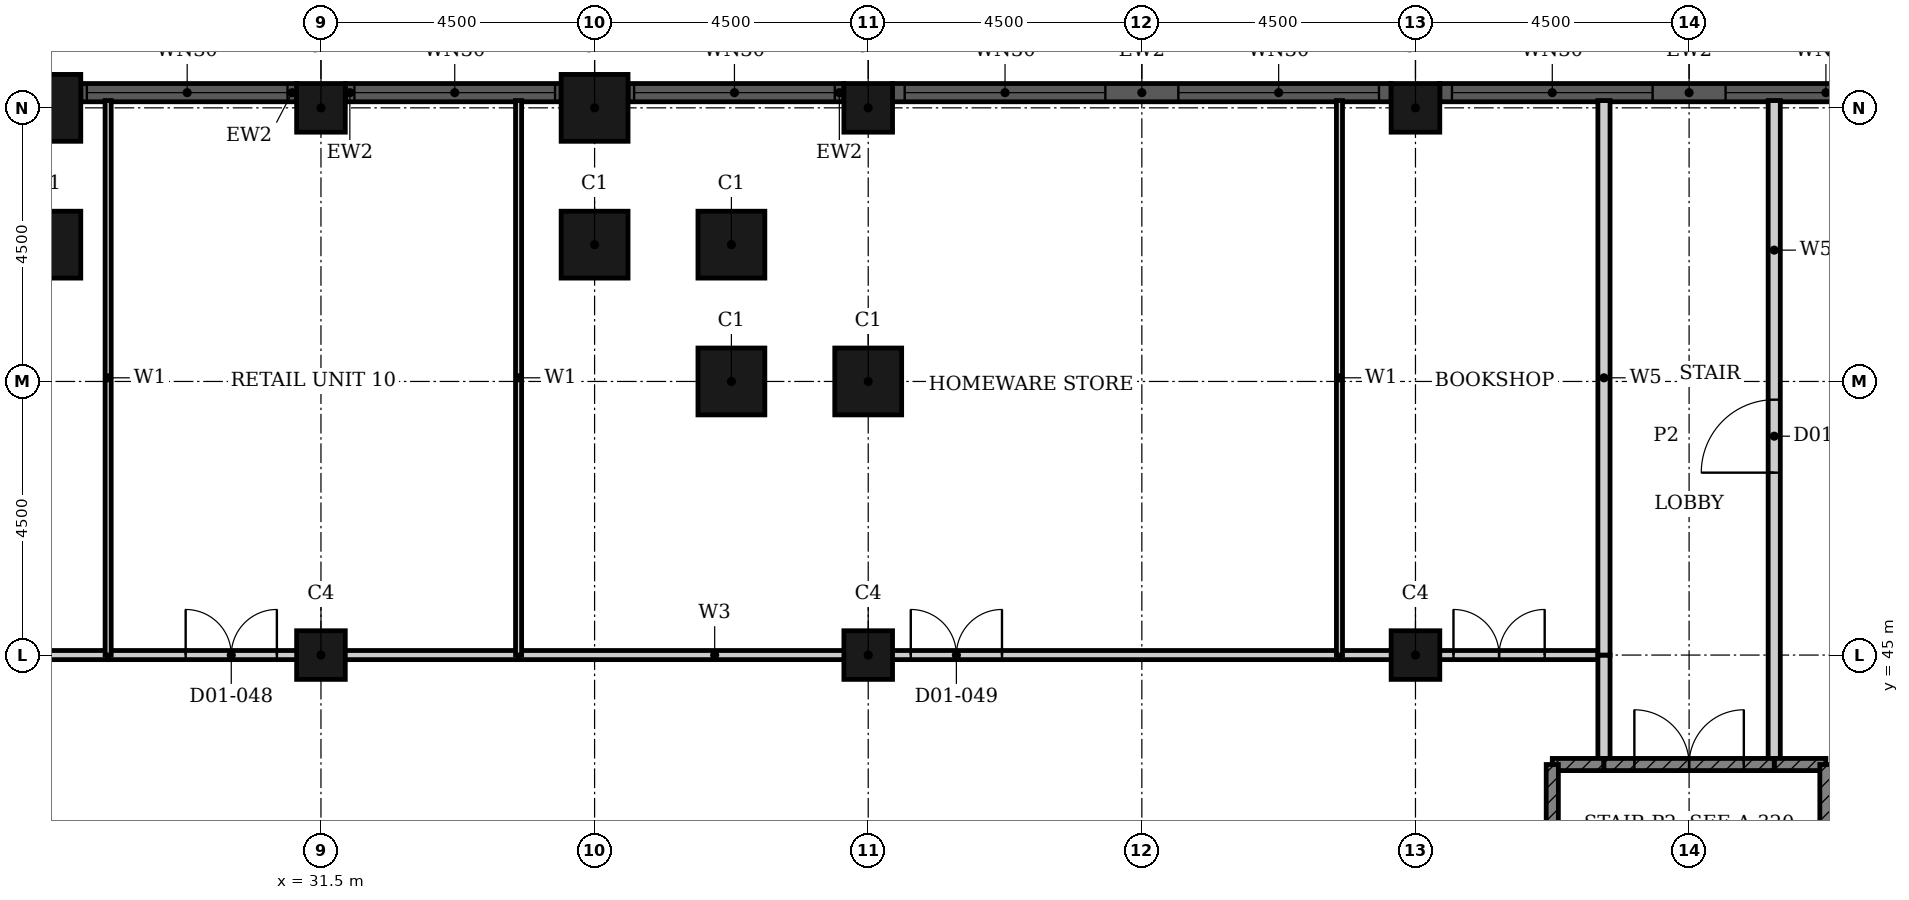
"""IFC4 building model, lengths in metres.
Left out: names, types, materials, properties, quantities, classifications, styles, units other than length and angle.
Written with IfcOpenShell. Run it as: python <this file> out.ifc"""

import sys

from ifc_helpers import new_model, si_unit, direction, frame, frame_2d, origin, origin_2d, place, context, subcontext, project, spatial, rectangle, hollow_rectangle, extrude, element, fill, save


model = new_model("IFC4")
c1 = context("Model", 3, precision=1e-05, world=origin(), true_north=direction((0.0, 1.0)))
c2 = subcontext(c1, "Body", "Model", "MODEL_VIEW")
j1 = project(units=[si_unit("LENGTHUNIT", "METRE"), si_unit("PLANEANGLEUNIT", "RADIAN")], contexts=[c1])
p1 = place(None, origin())
s1 = spatial("IfcSite", under=j1, at=p1, CompositionType="ELEMENT")
p2 = place(p1, origin())
s2 = spatial("IfcBuilding", under=s1, at=p2, CompositionType="ELEMENT")
p3 = place(p2, frame((0.0, 0.0, 6.6)))
s3 = spatial("IfcBuildingStorey", under=s2, at=p3, CompositionType="ELEMENT", Elevation=6.6)
for number, where, z_axis, x_axis in (
    (1, (40.5, 49.5, 0.0), (0.0, 0.0, 1.0), (1.0, 0.0, 0.0)),
    (2, (38.25, 49.5, 0.0), (0.0, 0.0, 1.0), (1.0, 0.0, 0.0)),
    (3, (38.25, 51.75, 0.0), (0.0, 0.0, 1.0), (1.0, 0.0, 0.0)),
    (4, (36.0, 51.75, 0.0), (0.0, 0.0, 1.0), (1.0, 0.0, 0.0)),
    (5, (36.0, 54.0, 0.0), (0.0, 0.0, 1.0), (1.0, 0.0, 0.0)),
    (6, (27.0, 54.0, 0.0), (0.0, 0.0, 1.0), (1.0, 0.0, 0.0)),
    (7, (27.0, 51.75, 0.0), (0.0, 0.0, 1.0), (1.0, 0.0, 0.0)),
):
    element("IfcColumn", number, at=place(p3, frame(where, z_axis=z_axis, x_axis=x_axis)), inside=s3, PredefinedType="COLUMN", context=c2, shape_type="SweptSolid", body=[
        extrude(hollow_rectangle(XDim=1.1, YDim=1.1, WallThickness=0.036, at=origin_2d()), origin(), (0.0, 0.0, 1.0), 5.4),
    ])
for number, where, z_axis, x_axis in (
    (8, (31.5, 54.0, 0.0), (0.0, 0.0, 1.0), (1.0, 0.0, 0.0)),
    (9, (40.5, 54.0, 0.0), (0.0, 0.0, 1.0), (1.0, 0.0, 0.0)),
    (10, (49.5, 54.0, 0.0), (0.0, 0.0, 1.0), (1.0, 0.0, 0.0)),
    (11, (31.5, 45.0, 0.0), (0.0, 0.0, 1.0), (1.0, 0.0, 0.0)),
    (12, (40.5, 45.0, 0.0), (0.0, 0.0, 1.0), (1.0, 0.0, 0.0)),
    (13, (49.5, 45.0, 0.0), (0.0, 0.0, 1.0), (1.0, 0.0, 0.0)),
):
    element("IfcColumn", number, at=place(p3, frame(where, z_axis=z_axis, x_axis=x_axis)), inside=s3, PredefinedType="COLUMN", context=c2, shape_type="SweptSolid", body=[
        extrude(hollow_rectangle(XDim=0.8, YDim=0.8, WallThickness=0.025, at=origin_2d()), origin(), (0.0, 0.0, 1.0), 5.4),
    ])
p4 = place(p3, frame((58.1, 54.25, 0.0), z_axis=(0.0, 0.0, 1.0), x_axis=(-1.0, 0.0, 0.0)))
e14 = element("IfcWall", 14, at=p4, inside=s3, PredefinedType="SOLIDWALL", context=c2, shape_type="SweptSolid", body=[
    extrude(rectangle(XDim=8.2, YDim=0.3, at=frame_2d((4.1, 0.0))), origin(), (0.0, 0.0, 1.0), 5.4),
])
p5 = place(p4, frame((0.2, 0.0, 0.9)))
e15 = element("IfcOpeningElement", 15, at=p5, cuts=e14, PredefinedType="OPENING", context=c2, shape_type="SweptSolid", body=[
    extrude(rectangle(XDim=3.3, YDim=3.5, at=frame_2d((1.65, 1.75))), frame((0.0, 0.16, 0.0), z_axis=(0.0, -1.0, 0.0), x_axis=(1.0, 0.0, 0.0)), (0.0, 0.0, 1.0), 0.32),
])
p6 = place(p4, frame((4.7, 0.0, 0.9)))
e16 = element("IfcOpeningElement", 16, at=p6, cuts=e14, PredefinedType="OPENING", context=c2, shape_type="SweptSolid", body=[
    extrude(rectangle(XDim=3.3, YDim=3.5, at=frame_2d((1.65, 1.75))), frame((0.0, 0.16, 0.0), z_axis=(0.0, -1.0, 0.0), x_axis=(1.0, 0.0, 0.0)), (0.0, 0.0, 1.0), 0.32),
])
p7 = place(p3, frame((49.1, 54.25, 0.0), z_axis=(0.0, 0.0, 1.0), x_axis=(-1.0, 0.0, 0.0)))
e17 = element("IfcWall", 17, at=p7, inside=s3, PredefinedType="SOLIDWALL", context=c2, shape_type="SweptSolid", body=[
    extrude(rectangle(XDim=8.2, YDim=0.3, at=frame_2d((4.1, 0.0))), origin(), (0.0, 0.0, 1.0), 5.4),
])
p8 = place(p7, frame((0.2, 0.0, 0.9)))
e18 = element("IfcOpeningElement", 18, at=p8, cuts=e17, PredefinedType="OPENING", context=c2, shape_type="SweptSolid", body=[
    extrude(rectangle(XDim=3.3, YDim=3.5, at=frame_2d((1.65, 1.75))), frame((0.0, 0.16, 0.0), z_axis=(0.0, -1.0, 0.0), x_axis=(1.0, 0.0, 0.0)), (0.0, 0.0, 1.0), 0.32),
])
p9 = place(p7, frame((4.7, 0.0, 0.9)))
e19 = element("IfcOpeningElement", 19, at=p9, cuts=e17, PredefinedType="OPENING", context=c2, shape_type="SweptSolid", body=[
    extrude(rectangle(XDim=3.3, YDim=3.5, at=frame_2d((1.65, 1.75))), frame((0.0, 0.16, 0.0), z_axis=(0.0, -1.0, 0.0), x_axis=(1.0, 0.0, 0.0)), (0.0, 0.0, 1.0), 0.32),
])
p10 = place(p3, frame((40.1, 54.25, 0.0), z_axis=(0.0, 0.0, 1.0), x_axis=(-1.0, 0.0, 0.0)))
e20 = element("IfcWall", 20, at=p10, inside=s3, PredefinedType="SOLIDWALL", context=c2, shape_type="SweptSolid", body=[
    extrude(rectangle(XDim=3.55, YDim=0.3, at=frame_2d((1.775, 0.0))), origin(), (0.0, 0.0, 1.0), 5.4),
])
p11 = place(p10, frame((0.15, 0.0, 0.9)))
e21 = element("IfcOpeningElement", 21, at=p11, cuts=e20, PredefinedType="OPENING", context=c2, shape_type="SweptSolid", body=[
    extrude(rectangle(XDim=3.3, YDim=3.5, at=frame_2d((1.65, 1.75))), frame((0.0, 0.16, 0.0), z_axis=(0.0, -1.0, 0.0), x_axis=(1.0, 0.0, 0.0)), (0.0, 0.0, 1.0), 0.32),
])
p12 = place(p3, frame((35.45, 54.25, 0.0), z_axis=(0.0, 0.0, 1.0), x_axis=(-1.0, 0.0, 0.0)))
e22 = element("IfcWall", 22, at=p12, inside=s3, PredefinedType="SOLIDWALL", context=c2, shape_type="SweptSolid", body=[
    extrude(rectangle(XDim=3.55, YDim=0.3, at=frame_2d((1.775, 0.0))), origin(), (0.0, 0.0, 1.0), 5.4),
])
p13 = place(p12, frame((0.1, 0.0, 0.9)))
e23 = element("IfcOpeningElement", 23, at=p13, cuts=e22, PredefinedType="OPENING", context=c2, shape_type="SweptSolid", body=[
    extrude(rectangle(XDim=3.3, YDim=3.5, at=frame_2d((1.65, 1.75))), frame((0.0, 0.16, 0.0), z_axis=(0.0, -1.0, 0.0), x_axis=(1.0, 0.0, 0.0)), (0.0, 0.0, 1.0), 0.32),
])
p14 = place(p3, frame((31.1, 54.25, 0.0), z_axis=(0.0, 0.0, 1.0), x_axis=(-1.0, 0.0, 0.0)))
e24 = element("IfcWall", 24, at=p14, inside=s3, PredefinedType="SOLIDWALL", context=c2, shape_type="SweptSolid", body=[
    extrude(rectangle(XDim=3.55, YDim=0.3, at=frame_2d((1.775, 0.0))), origin(), (0.0, 0.0, 1.0), 5.4),
])
p15 = place(p14, frame((0.15, 0.0, 0.9)))
e25 = element("IfcOpeningElement", 25, at=p15, cuts=e24, PredefinedType="OPENING", context=c2, shape_type="SweptSolid", body=[
    extrude(rectangle(XDim=3.3, YDim=3.5, at=frame_2d((1.65, 1.75))), frame((0.0, 0.16, 0.0), z_axis=(0.0, -1.0, 0.0), x_axis=(1.0, 0.0, 0.0)), (0.0, 0.0, 1.0), 0.32),
])
p16 = place(p3, frame((18.0, 45.0, 0.0), z_axis=(0.0, 0.0, 1.0), x_axis=(1.0, 0.0, 0.0)))
e26 = element("IfcWall", 26, at=p16, inside=s3, PredefinedType="PARTITIONING", context=c2, shape_type="SweptSolid", body=[
    extrude(rectangle(XDim=10.0, YDim=0.15, at=frame_2d((5.0, 0.0))), origin(), (0.0, 0.0, 1.0), 5.05),
])
p17 = place(p16, frame((5.15, 0.0, 0.0)))
e27 = element("IfcOpeningElement", 27, at=p17, cuts=e26, PredefinedType="OPENING", context=c2, shape_type="SweptSolid", body=[
    extrude(rectangle(XDim=1.5, YDim=2.4, at=frame_2d((0.75, 1.2))), frame((0.0, 0.085, 0.0), z_axis=(0.0, -1.0, 0.0), x_axis=(1.0, 0.0, 0.0)), (0.0, 0.0, 1.0), 0.17),
])
p18 = place(p3, frame((28.0, 45.0, 0.0), z_axis=(0.0, 0.0, 1.0), x_axis=(1.0, 0.0, 0.0)))
e28 = element("IfcWall", 28, at=p18, inside=s3, PredefinedType="PARTITIONING", context=c2, shape_type="SweptSolid", body=[
    extrude(rectangle(XDim=6.75, YDim=0.15, at=frame_2d((3.375, 0.0))), origin(), (0.0, 0.0, 1.0), 5.05),
])
p19 = place(p18, frame((1.275, 0.0, 0.0)))
e29 = element("IfcOpeningElement", 29, at=p19, cuts=e28, PredefinedType="OPENING", context=c2, shape_type="SweptSolid", body=[
    extrude(rectangle(XDim=1.5, YDim=2.4, at=frame_2d((0.75, 1.2))), frame((0.0, 0.085, 0.0), z_axis=(0.0, -1.0, 0.0), x_axis=(1.0, 0.0, 0.0)), (0.0, 0.0, 1.0), 0.17),
])
p20 = place(p3, frame((34.75, 45.0, 0.0), z_axis=(0.0, 0.0, 1.0), x_axis=(1.0, 0.0, 0.0)))
e30 = element("IfcWall", 30, at=p20, inside=s3, PredefinedType="PARTITIONING", context=c2, shape_type="SweptSolid", body=[
    extrude(rectangle(XDim=13.5, YDim=0.15, at=frame_2d((6.75, 0.0))), origin(), (0.0, 0.0, 1.0), 5.05),
])
p21 = place(p20, frame((6.45, 0.0, 0.0)))
e31 = element("IfcOpeningElement", 31, at=p21, cuts=e30, PredefinedType="OPENING", context=c2, shape_type="SweptSolid", body=[
    extrude(rectangle(XDim=1.5, YDim=2.4, at=frame_2d((0.75, 1.2))), frame((0.0, 0.085, 0.0), z_axis=(0.0, -1.0, 0.0), x_axis=(1.0, 0.0, 0.0)), (0.0, 0.0, 1.0), 0.17),
])
p22 = place(p3, frame((48.25, 45.0, 0.0), z_axis=(0.0, 0.0, 1.0), x_axis=(1.0, 0.0, 0.0)))
e32 = element("IfcWall", 32, at=p22, inside=s3, PredefinedType="PARTITIONING", context=c2, shape_type="SweptSolid", body=[
    extrude(rectangle(XDim=4.35, YDim=0.15, at=frame_2d((2.175, 0.0))), origin(), (0.0, 0.0, 1.0), 5.05),
])
p23 = place(p22, frame((1.875, 0.0, 0.0)))
e33 = element("IfcOpeningElement", 33, at=p23, cuts=e32, PredefinedType="OPENING", context=c2, shape_type="SweptSolid", body=[
    extrude(rectangle(XDim=1.5, YDim=2.4, at=frame_2d((0.75, 1.2))), frame((0.0, 0.085, 0.0), z_axis=(0.0, -1.0, 0.0), x_axis=(1.0, 0.0, 0.0)), (0.0, 0.0, 1.0), 0.17),
])
for number, where, z_axis, x_axis in (
    (34, (28.0, 45.0, 0.0), (0.0, 0.0, 1.0), (0.0, 1.0, 0.0)),
    (35, (34.75, 45.0, 0.0), (0.0, 0.0, 1.0), (0.0, 1.0, 0.0)),
    (36, (48.25, 45.0, 0.0), (0.0, 0.0, 1.0), (0.0, 1.0, 0.0)),
):
    element("IfcWall", number, at=place(p3, frame(where, z_axis=z_axis, x_axis=x_axis)), inside=s3, PredefinedType="PARTITIONING", context=c2, shape_type="SweptSolid", body=[
        extrude(rectangle(XDim=9.12, YDim=0.1, at=frame_2d((4.56, 0.0))), origin(), (0.0, 0.0, 1.0), 5.05),
    ])
p24 = place(p3, frame((52.6, 43.2, 0.0), z_axis=(0.0, 0.0, 1.0), x_axis=(0.0, 1.0, 0.0)))
e37 = element("IfcWall", 37, at=p24, inside=s3, PredefinedType="PARTITIONING", context=c2, shape_type="SweptSolid", body=[
    extrude(rectangle(XDim=1.8, YDim=0.2, at=frame_2d((0.9, 0.0))), origin(), (0.0, 0.0, 1.0), 5.05),
])
p25 = place(p3, frame((52.6, 45.0, 0.0), z_axis=(0.0, 0.0, 1.0), x_axis=(0.0, 1.0, 0.0)))
e38 = element("IfcWall", 38, at=p25, inside=s3, PredefinedType="PARTITIONING", context=c2, shape_type="SweptSolid", body=[
    extrude(rectangle(XDim=9.12, YDim=0.2, at=frame_2d((4.56, 0.0))), origin(), (0.0, 0.0, 1.0), 5.05),
])
p26 = place(p3, frame((55.4, 43.2, 0.0), z_axis=(0.0, 0.0, 1.0), x_axis=(0.0, 1.0, 0.0)))
e39 = element("IfcWall", 39, at=p26, inside=s3, PredefinedType="PARTITIONING", context=c2, shape_type="SweptSolid", body=[
    extrude(rectangle(XDim=10.92, YDim=0.2, at=frame_2d((5.46, 0.0))), origin(), (0.0, 0.0, 1.0), 5.05),
])
p27 = place(p26, frame((4.8, 0.0, 0.0)))
e40 = element("IfcOpeningElement", 40, at=p27, cuts=e39, PredefinedType="OPENING", context=c2, shape_type="SweptSolid", body=[
    extrude(rectangle(XDim=1.2, YDim=2.1, at=frame_2d((0.6, 1.05))), frame((0.0, 0.11, 0.0), z_axis=(0.0, -1.0, 0.0), x_axis=(1.0, 0.0, 0.0)), (0.0, 0.0, 1.0), 0.22),
])
for number, where, z_axis, x_axis in (
    (41, (51.75, 43.2, 0.0), (0.0, 0.0, 1.0), (1.0, 0.0, 0.0)),
    (42, (55.4, 43.2, 0.0), (0.0, 0.0, 1.0), (1.0, 0.0, 0.0)),
):
    element("IfcWall", number, at=place(p3, frame(where, z_axis=z_axis, x_axis=x_axis)), inside=s3, PredefinedType="SHEAR", context=c2, shape_type="SweptSolid", body=[
        extrude(rectangle(XDim=0.85, YDim=0.2, at=frame_2d((0.425, 0.0))), origin(), (0.0, 0.0, 1.0), 5.05),
    ])
p28 = place(p3, frame((52.6, 43.2, 0.0), z_axis=(0.0, 0.0, 1.0), x_axis=(1.0, 0.0, 0.0)))
e43 = element("IfcWall", 43, at=p28, inside=s3, PredefinedType="SHEAR", context=c2, shape_type="SweptSolid", body=[
    extrude(rectangle(XDim=2.8, YDim=0.2, at=frame_2d((1.4, 0.0))), origin(), (0.0, 0.0, 1.0), 5.05),
])
p29 = place(p28, frame((0.5, 0.0, 0.0)))
e44 = element("IfcOpeningElement", 44, at=p29, cuts=e43, PredefinedType="OPENING", context=c2, shape_type="SweptSolid", body=[
    extrude(rectangle(XDim=1.8, YDim=2.1, at=frame_2d((0.9, 1.05))), frame((0.0, 0.11, 0.0), z_axis=(0.0, -1.0, 0.0), x_axis=(1.0, 0.0, 0.0)), (0.0, 0.0, 1.0), 0.22),
])
for number, where, z_axis, x_axis in (
    (45, (51.75, 34.75, 0.0), (0.0, 0.0, 1.0), (0.0, 1.0, 0.0)),
    (46, (56.25, 34.75, 0.0), (0.0, 0.0, 1.0), (0.0, 1.0, 0.0)),
):
    element("IfcWall", number, at=place(p3, frame(where, z_axis=z_axis, x_axis=x_axis)), inside=s3, PredefinedType="SHEAR", context=c2, shape_type="SweptSolid", body=[
        extrude(rectangle(XDim=8.45, YDim=0.2, at=frame_2d((4.225, 0.0))), origin(), (0.0, 0.0, 1.0), 5.05),
    ])
p30 = place(p5, origin())
e47 = element("IfcWindow", 47, at=p30, inside=s3, PartitioningType="SINGLE_PANEL", PredefinedType="WINDOW", context=c2, shape_type="SweptSolid", body=[
    extrude(rectangle(XDim=3.3, YDim=3.5, at=frame_2d((1.65, 1.75))), frame((0.0, 0.03, 0.0), z_axis=(0.0, -1.0, 0.0), x_axis=(1.0, 0.0, 0.0)), (0.0, 0.0, 1.0), 0.06),
])
fill(e15, e47)
p31 = place(p6, origin())
e48 = element("IfcWindow", 48, at=p31, inside=s3, PartitioningType="SINGLE_PANEL", PredefinedType="WINDOW", context=c2, shape_type="SweptSolid", body=[
    extrude(rectangle(XDim=3.3, YDim=3.5, at=frame_2d((1.65, 1.75))), frame((0.0, 0.03, 0.0), z_axis=(0.0, -1.0, 0.0), x_axis=(1.0, 0.0, 0.0)), (0.0, 0.0, 1.0), 0.06),
])
fill(e16, e48)
p32 = place(p8, origin())
e49 = element("IfcWindow", 49, at=p32, inside=s3, PartitioningType="SINGLE_PANEL", PredefinedType="WINDOW", context=c2, shape_type="SweptSolid", body=[
    extrude(rectangle(XDim=3.3, YDim=3.5, at=frame_2d((1.65, 1.75))), frame((0.0, 0.03, 0.0), z_axis=(0.0, -1.0, 0.0), x_axis=(1.0, 0.0, 0.0)), (0.0, 0.0, 1.0), 0.06),
])
fill(e18, e49)
p33 = place(p9, origin())
e50 = element("IfcWindow", 50, at=p33, inside=s3, PartitioningType="SINGLE_PANEL", PredefinedType="WINDOW", context=c2, shape_type="SweptSolid", body=[
    extrude(rectangle(XDim=3.3, YDim=3.5, at=frame_2d((1.65, 1.75))), frame((0.0, 0.03, 0.0), z_axis=(0.0, -1.0, 0.0), x_axis=(1.0, 0.0, 0.0)), (0.0, 0.0, 1.0), 0.06),
])
fill(e19, e50)
p34 = place(p11, origin())
e51 = element("IfcWindow", 51, at=p34, inside=s3, PartitioningType="SINGLE_PANEL", PredefinedType="WINDOW", context=c2, shape_type="SweptSolid", body=[
    extrude(rectangle(XDim=3.3, YDim=3.5, at=frame_2d((1.65, 1.75))), frame((0.0, 0.03, 0.0), z_axis=(0.0, -1.0, 0.0), x_axis=(1.0, 0.0, 0.0)), (0.0, 0.0, 1.0), 0.06),
])
fill(e21, e51)
p35 = place(p13, origin())
e52 = element("IfcWindow", 52, at=p35, inside=s3, PartitioningType="SINGLE_PANEL", PredefinedType="WINDOW", context=c2, shape_type="SweptSolid", body=[
    extrude(rectangle(XDim=3.3, YDim=3.5, at=frame_2d((1.65, 1.75))), frame((0.0, 0.03, 0.0), z_axis=(0.0, -1.0, 0.0), x_axis=(1.0, 0.0, 0.0)), (0.0, 0.0, 1.0), 0.06),
])
fill(e23, e52)
p36 = place(p15, origin())
e53 = element("IfcWindow", 53, at=p36, inside=s3, PartitioningType="SINGLE_PANEL", PredefinedType="WINDOW", context=c2, shape_type="SweptSolid", body=[
    extrude(rectangle(XDim=3.3, YDim=3.5, at=frame_2d((1.65, 1.75))), frame((0.0, 0.03, 0.0), z_axis=(0.0, -1.0, 0.0), x_axis=(1.0, 0.0, 0.0)), (0.0, 0.0, 1.0), 0.06),
])
fill(e25, e53)
p37 = place(p27, origin())
e54 = element("IfcDoor", 54, at=p37, inside=s3, OperationType="SINGLE_SWING_LEFT", PredefinedType="DOOR", context=c2, shape_type="SweptSolid", body=[
    extrude(rectangle(XDim=1.2, YDim=2.1, at=frame_2d((0.6, 1.05))), frame((0.0, 0.025, 0.0), z_axis=(0.0, -1.0, 0.0), x_axis=(1.0, 0.0, 0.0)), (0.0, 0.0, 1.0), 0.05),
])
fill(e40, e54)
p38 = place(p29, origin())
e55 = element("IfcDoor", 55, at=p38, inside=s3, OperationType="DOUBLE_DOOR_SINGLE_SWING", PredefinedType="DOOR", context=c2, shape_type="SweptSolid", body=[
    extrude(rectangle(XDim=1.8, YDim=2.1, at=frame_2d((0.9, 1.05))), frame((0.0, 0.025, 0.0), z_axis=(0.0, -1.0, 0.0), x_axis=(1.0, 0.0, 0.0)), (0.0, 0.0, 1.0), 0.05),
])
fill(e44, e55)
p39 = place(p19, origin())
e56 = element("IfcDoor", 56, at=p39, inside=s3, OperationType="DOUBLE_DOOR_SINGLE_SWING", PredefinedType="DOOR", context=c2, shape_type="SweptSolid", body=[
    extrude(rectangle(XDim=1.5, YDim=2.4, at=frame_2d((0.75, 1.2))), frame((0.0, 0.025, 0.0), z_axis=(0.0, -1.0, 0.0), x_axis=(1.0, 0.0, 0.0)), (0.0, 0.0, 1.0), 0.05),
])
fill(e29, e56)
p40 = place(p21, origin())
e57 = element("IfcDoor", 57, at=p40, inside=s3, OperationType="DOUBLE_DOOR_SINGLE_SWING", PredefinedType="DOOR", context=c2, shape_type="SweptSolid", body=[
    extrude(rectangle(XDim=1.5, YDim=2.4, at=frame_2d((0.75, 1.2))), frame((0.0, 0.025, 0.0), z_axis=(0.0, -1.0, 0.0), x_axis=(1.0, 0.0, 0.0)), (0.0, 0.0, 1.0), 0.05),
])
fill(e31, e57)
p41 = place(p23, origin())
e58 = element("IfcDoor", 58, at=p41, inside=s3, OperationType="DOUBLE_DOOR_SINGLE_SWING", PredefinedType="DOOR", context=c2, shape_type="SweptSolid", body=[
    extrude(rectangle(XDim=1.5, YDim=2.4, at=frame_2d((0.75, 1.2))), frame((0.0, 0.025, 0.0), z_axis=(0.0, -1.0, 0.0), x_axis=(1.0, 0.0, 0.0)), (0.0, 0.0, 1.0), 0.05),
])
fill(e33, e58)
save(model, sys.argv[1])
